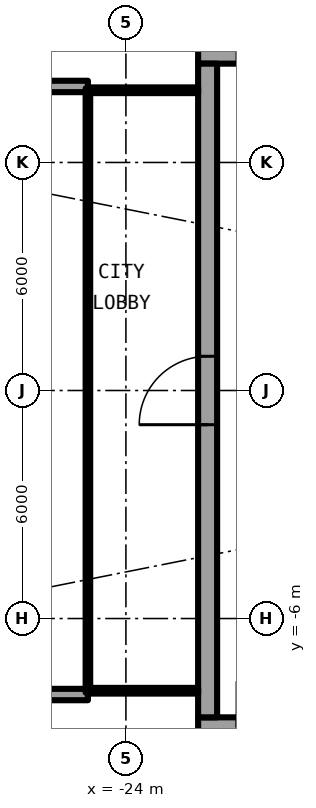
"""IFC4 building model, lengths in metres.
Left out: names, types, materials, properties, quantities, classifications, styles, units other than length and angle.
Written with IfcOpenShell. Run it as: python <this file> out.ifc"""

import sys

from ifc_helpers import new_model, si_unit, direction, frame, frame_2d, origin, place, context, subcontext, project, spatial, rectangle, extrude, element, fill, save


model = new_model("IFC4")
c1 = context("Model", 3, precision=1e-05, world=origin(), true_north=direction((0.0, 1.0)))
c2 = subcontext(c1, "Body", "Model", "MODEL_VIEW")
j1 = project(units=[si_unit("LENGTHUNIT", "METRE"), si_unit("PLANEANGLEUNIT", "RADIAN")], contexts=[c1])
p1 = place(None, origin())
s1 = spatial("IfcSite", under=j1, at=p1, CompositionType="ELEMENT")
p2 = place(p1, origin())
s2 = spatial("IfcBuilding", under=s1, at=p2, CompositionType="ELEMENT")
p3 = place(p2, frame((0.0, 0.0, 154.35)))
s3 = spatial("IfcBuildingStorey", under=s2, at=p3, CompositionType="ELEMENT", Elevation=154.35)
for number, where, z_axis, x_axis in (
    (1, (-25.0, 8.0, 0.0), (0.0, 0.0, 1.0), (-1.0, 0.0, 0.0)),
    (2, (-25.0, -8.0, 0.0), (0.0, 0.0, 1.0), (-1.0, 0.0, 0.0)),
):
    element("IfcWall", number, at=place(p3, frame(where, z_axis=z_axis, x_axis=x_axis)), inside=s3, PredefinedType="SOLIDWALL", context=c2, shape_type="SweptSolid", body=[
        extrude(rectangle(XDim=2.667, YDim=0.3, at=frame_2d((1.333, 0.0))), origin(), (0.0, 0.0, 1.0), 2.7),
    ])
p4 = place(p3, frame((-22.1, -8.85, 0.0), z_axis=(0.0, 0.0, 1.0), x_axis=(1.0, 0.0, 0.0)))
e3 = element("IfcWall", 3, at=p4, inside=s3, PredefinedType="SHEAR", context=c2, shape_type="SweptSolid", body=[
    extrude(rectangle(XDim=13.6, YDim=0.5, at=frame_2d((6.8, 0.0))), origin(), (0.0, 0.0, 1.0), 3.05),
])
p5 = place(p4, frame((1.025, 0.0, 0.0)))
e4 = element("IfcOpeningElement", 4, at=p5, cuts=e3, PredefinedType="OPENING", context=c2, shape_type="SweptSolid", body=[
    extrude(rectangle(XDim=1.2, YDim=2.3, at=frame_2d((0.6, 1.15))), frame((0.0, 0.26, 0.0), z_axis=(0.0, -1.0, 0.0), x_axis=(1.0, 0.0, 0.0)), (0.0, 0.0, 1.0), 0.52),
])
p6 = place(p3, frame((-8.5, 8.85, 0.0), z_axis=(0.0, 0.0, 1.0), x_axis=(-1.0, 0.0, 0.0)))
e5 = element("IfcWall", 5, at=p6, inside=s3, PredefinedType="SHEAR", context=c2, shape_type="SweptSolid", body=[
    extrude(rectangle(XDim=13.6, YDim=0.5, at=frame_2d((6.8, 0.0))), origin(), (0.0, 0.0, 1.0), 3.05),
])
p7 = place(p6, frame((11.375, 0.0, 0.0)))
e6 = element("IfcOpeningElement", 6, at=p7, cuts=e5, PredefinedType="OPENING", context=c2, shape_type="SweptSolid", body=[
    extrude(rectangle(XDim=1.2, YDim=2.3, at=frame_2d((0.6, 1.15))), frame((0.0, 0.26, 0.0), z_axis=(0.0, -1.0, 0.0), x_axis=(1.0, 0.0, 0.0)), (0.0, 0.0, 1.0), 0.52),
])
p8 = place(p3, frame((-21.85, -8.6, 0.0), z_axis=(0.0, 0.0, 1.0), x_axis=(0.0, 1.0, 0.0)))
e7 = element("IfcWall", 7, at=p8, inside=s3, PredefinedType="SHEAR", context=c2, shape_type="SweptSolid", body=[
    extrude(rectangle(XDim=17.2, YDim=0.5, at=frame_2d((8.6, 0.0))), origin(), (0.0, 0.0, 1.0), 3.05),
])
p9 = place(p8, frame((7.7, 0.0, 0.0)))
e8 = element("IfcOpeningElement", 8, at=p9, cuts=e7, PredefinedType="OPENING", context=c2, shape_type="SweptSolid", body=[
    extrude(rectangle(XDim=1.8, YDim=2.3, at=frame_2d((0.9, 1.15))), frame((0.0, 0.26, 0.0), z_axis=(0.0, -1.0, 0.0), x_axis=(1.0, 0.0, 0.0)), (0.0, 0.0, 1.0), 0.52),
])
for number, where, z_axis, x_axis in (
    (9, (-22.1, 7.9, 0.0), (0.0, 0.0, 1.0), (-1.0, 0.0, 0.0)),
    (10, (-22.1, -7.9, 0.0), (0.0, 0.0, 1.0), (-1.0, 0.0, 0.0)),
):
    element("IfcWall", number, at=place(p3, frame(where, z_axis=z_axis, x_axis=x_axis)), inside=s3, PredefinedType="PARTITIONING", context=c2, shape_type="SweptSolid", body=[
        extrude(rectangle(XDim=2.84, YDim=0.15, at=frame_2d((1.42, 0.0))), origin(), (0.0, 0.0, 1.0), 2.7),
    ])
p10 = place(p3, frame((-25.0, 7.95, 0.0), z_axis=(0.0, 0.0, 1.0), x_axis=(0.0, -1.0, 0.0)))
e11 = element("IfcWall", 11, at=p10, inside=s3, PredefinedType="PARTITIONING", context=c2, shape_type="SweptSolid", body=[
    extrude(rectangle(XDim=15.9, YDim=0.12, at=frame_2d((7.95, 0.0))), origin(), (0.0, 0.0, 1.0), 2.7),
])
p11 = place(p10, frame((0.95, 0.0, 0.1)))
e12 = element("IfcOpeningElement", 12, at=p11, cuts=e11, PredefinedType="OPENING", context=c2, shape_type="SweptSolid", body=[
    extrude(rectangle(XDim=14.0, YDim=2.35, at=frame_2d((7.0, 1.175))), frame((0.0, 0.07, 0.0), z_axis=(0.0, -1.0, 0.0), x_axis=(1.0, 0.0, 0.0)), (0.0, 0.0, 1.0), 0.14),
])
p12 = place(p9, origin())
e13 = element("IfcDoor", 13, at=p12, inside=s3, OperationType="SINGLE_SWING_LEFT", PredefinedType="DOOR", context=c2, shape_type="SweptSolid", body=[
    extrude(rectangle(XDim=1.8, YDim=2.3, at=frame_2d((0.9, 1.15))), frame((0.0, 0.025, 0.0), z_axis=(0.0, -1.0, 0.0), x_axis=(1.0, 0.0, 0.0)), (0.0, 0.0, 1.0), 0.05),
])
fill(e8, e13)
p13 = place(p11, origin())
e14 = element("IfcWindow", 14, at=p13, inside=s3, PartitioningType="SINGLE_PANEL", PredefinedType="WINDOW", context=c2, shape_type="SweptSolid", body=[
    extrude(rectangle(XDim=14.0, YDim=2.35, at=frame_2d((7.0, 1.175))), frame((0.0, 0.03, 0.0), z_axis=(0.0, -1.0, 0.0), x_axis=(1.0, 0.0, 0.0)), (0.0, 0.0, 1.0), 0.06),
])
fill(e12, e14)
save(model, sys.argv[1])
